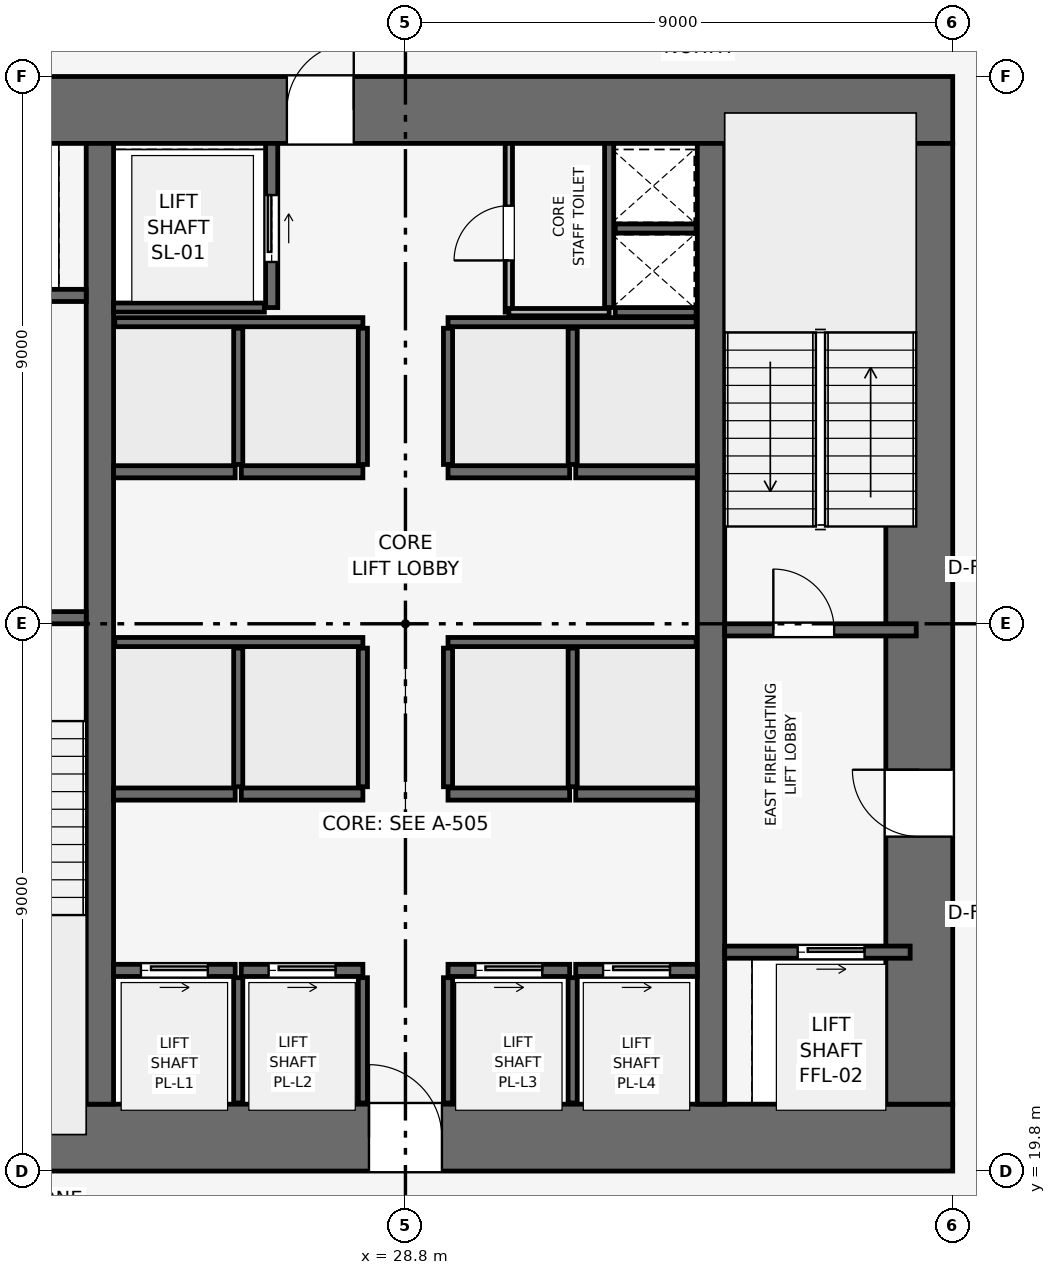
"""IFC4 building model, lengths in metres.
Left out: names, types, materials, properties, quantities, classifications, styles, units other than length and angle.
Written with IfcOpenShell. Run it as: python <this file> out.ifc"""

import sys

from ifc_helpers import new_model, si_unit, direction, frame, frame_2d, origin, place, context, subcontext, project, spatial, rectangle, extrude, element, fill, save


model = new_model("IFC4")
c1 = context("Model", 3, precision=1e-05, world=origin(), true_north=direction((0.0, 1.0)))
c2 = subcontext(c1, "Body", "Model", "MODEL_VIEW")
j1 = project(units=[si_unit("LENGTHUNIT", "METRE"), si_unit("PLANEANGLEUNIT", "RADIAN")], contexts=[c1])
p1 = place(None, origin())
s1 = spatial("IfcSite", under=j1, at=p1, CompositionType="ELEMENT")
p2 = place(p1, origin())
s2 = spatial("IfcBuilding", under=s1, at=p2, CompositionType="ELEMENT")
p3 = place(p2, frame((0.0, 0.0, 100.2)))
s3 = spatial("IfcBuildingStorey", under=s2, at=p3, CompositionType="ELEMENT", Elevation=100.2)
p4 = place(p3, frame((19.8, 20.35, 0.0), z_axis=(0.0, 0.0, 1.0), x_axis=(1.0, 0.0, 0.0)))
e1 = element("IfcWall", 1, at=p4, inside=s3, PredefinedType="SHEAR", context=c2, shape_type="SweptSolid", body=[
    extrude(rectangle(XDim=18.0, YDim=1.1, at=frame_2d((9.0, 0.0))), origin(), (0.0, 0.0, 1.0), 3.9),
])
p5 = place(p4, frame((8.4, 0.0, 0.0)))
e2 = element("IfcOpeningElement", 2, at=p5, cuts=e1, PredefinedType="OPENING", context=c2, shape_type="SweptSolid", body=[
    extrude(rectangle(XDim=1.2, YDim=2.2, at=frame_2d((0.6, 1.1))), frame((0.0, 0.56, 0.0), z_axis=(0.0, -1.0, 0.0), x_axis=(1.0, 0.0, 0.0)), (0.0, 0.0, 1.0), 1.12),
])
p6 = place(p3, frame((19.8, 37.25, 0.0), z_axis=(0.0, 0.0, 1.0), x_axis=(1.0, 0.0, 0.0)))
e3 = element("IfcWall", 3, at=p6, inside=s3, PredefinedType="SHEAR", context=c2, shape_type="SweptSolid", body=[
    extrude(rectangle(XDim=18.0, YDim=1.1, at=frame_2d((9.0, 0.0))), origin(), (0.0, 0.0, 1.0), 3.9),
])
p7 = place(p6, frame((7.05, 0.0, 0.0)))
e4 = element("IfcOpeningElement", 4, at=p7, cuts=e3, PredefinedType="OPENING", context=c2, shape_type="SweptSolid", body=[
    extrude(rectangle(XDim=1.1, YDim=2.15, at=frame_2d((0.55, 1.075))), frame((0.0, 0.56, 0.0), z_axis=(0.0, -1.0, 0.0), x_axis=(1.0, 0.0, 0.0)), (0.0, 0.0, 1.0), 1.12),
])
p8 = place(p3, frame((37.25, 20.9, 0.0), z_axis=(0.0, 0.0, 1.0), x_axis=(0.0, 1.0, 0.0)))
e5 = element("IfcWall", 5, at=p8, inside=s3, PredefinedType="SHEAR", context=c2, shape_type="SweptSolid", body=[
    extrude(rectangle(XDim=15.8, YDim=1.1, at=frame_2d((7.9, 0.0))), origin(), (0.0, 0.0, 1.0), 3.9),
])
p9 = place(p8, frame((4.4, 0.0, 0.0)))
e6 = element("IfcOpeningElement", 6, at=p9, cuts=e5, PredefinedType="OPENING", context=c2, shape_type="SweptSolid", body=[
    extrude(rectangle(XDim=1.1, YDim=2.15, at=frame_2d((0.55, 1.075))), frame((0.0, 0.56, 0.0), z_axis=(0.0, -1.0, 0.0), x_axis=(1.0, 0.0, 0.0)), (0.0, 0.0, 1.0), 1.12),
])
for number, where, z_axis, x_axis in (
    (7, (23.775, 20.9, 0.0), (0.0, 0.0, 1.0), (0.0, 1.0, 0.0)),
    (8, (33.825, 20.9, 0.0), (0.0, 0.0, 1.0), (0.0, 1.0, 0.0)),
):
    element("IfcWall", number, at=place(p3, frame(where, z_axis=z_axis, x_axis=x_axis)), inside=s3, PredefinedType="SHEAR", context=c2, shape_type="SweptSolid", body=[
        extrude(rectangle(XDim=15.8, YDim=0.45, at=frame_2d((7.9, 0.0))), origin(), (0.0, 0.0, 1.0), 3.9),
    ])
p10 = place(p3, frame((20.4, 28.9, 0.0), z_axis=(0.0, 0.0, 1.0), x_axis=(1.0, 0.0, 0.0)))
e9 = element("IfcWall", 9, at=p10, inside=s3, PredefinedType="SHEAR", context=c2, shape_type="SweptSolid", body=[
    extrude(rectangle(XDim=3.15, YDim=0.2, at=frame_2d((1.575, 0.0))), origin(), (0.0, 0.0, 1.0), 3.65),
])
p11 = place(p10, frame((0.8, 0.0, 0.0)))
e10 = element("IfcOpeningElement", 10, at=p11, cuts=e9, PredefinedType="OPENING", context=c2, shape_type="SweptSolid", body=[
    extrude(rectangle(XDim=1.0, YDim=2.1, at=frame_2d((0.5, 1.05))), frame((0.0, 0.11, 0.0), z_axis=(0.0, -1.0, 0.0), x_axis=(1.0, 0.0, 0.0)), (0.0, 0.0, 1.0), 0.22),
])
p12 = place(p3, frame((34.05, 28.7, 0.0), z_axis=(0.0, 0.0, 1.0), x_axis=(1.0, 0.0, 0.0)))
e11 = element("IfcWall", 11, at=p12, inside=s3, PredefinedType="SHEAR", context=c2, shape_type="SweptSolid", body=[
    extrude(rectangle(XDim=3.15, YDim=0.2, at=frame_2d((1.575, 0.0))), origin(), (0.0, 0.0, 1.0), 3.65),
])
p13 = place(p12, frame((0.8, 0.0, 0.0)))
e12 = element("IfcOpeningElement", 12, at=p13, cuts=e11, PredefinedType="OPENING", context=c2, shape_type="SweptSolid", body=[
    extrude(rectangle(XDim=1.0, YDim=2.1, at=frame_2d((0.5, 1.05))), frame((0.0, 0.11, 0.0), z_axis=(0.0, -1.0, 0.0), x_axis=(1.0, 0.0, 0.0)), (0.0, 0.0, 1.0), 0.22),
])
p14 = place(p3, frame((32.15, 34.0, 0.0), z_axis=(0.0, 0.0, 1.0), x_axis=(0.0, 1.0, 0.0)))
e13 = element("IfcWall", 13, at=p14, inside=s3, PredefinedType="SHEAR", context=c2, shape_type="SweptSolid", body=[
    extrude(rectangle(XDim=2.7, YDim=0.15, at=frame_2d((1.35, 0.0))), origin(), (0.0, 0.0, 1.0), 3.65),
])
for number, where, z_axis, x_axis in (
    (14, (32.25, 33.925, 0.0), (0.0, 0.0, 1.0), (1.0, 0.0, 0.0)),
    (15, (32.25, 35.3, 0.0), (0.0, 0.0, 1.0), (1.0, 0.0, 0.0)),
):
    element("IfcWall", number, at=place(p3, frame(where, z_axis=z_axis, x_axis=x_axis)), inside=s3, PredefinedType="SHEAR", context=c2, shape_type="SweptSolid", body=[
        extrude(rectangle(XDim=1.33, YDim=0.15, at=frame_2d((0.665, 0.0))), origin(), (0.0, 0.0, 1.0), 3.65),
    ])
p15 = place(p3, frame((20.5, 34.2, 0.0), z_axis=(0.0, 0.0, 1.0), x_axis=(1.0, 0.0, 0.0)))
e16 = element("IfcWall", 16, at=p15, inside=s3, PredefinedType="SHEAR", context=c2, shape_type="SweptSolid", body=[
    extrude(rectangle(XDim=3.05, YDim=0.2, at=frame_2d((1.525, 0.0))), origin(), (0.0, 0.0, 1.0), 3.65),
])
p16 = place(p15, frame((0.75, 0.0, 0.0)))
e17 = element("IfcOpeningElement", 17, at=p16, cuts=e16, PredefinedType="OPENING", context=c2, shape_type="SweptSolid", body=[
    extrude(rectangle(XDim=1.1, YDim=2.15, at=frame_2d((0.55, 1.075))), frame((0.0, 0.11, 0.0), z_axis=(0.0, -1.0, 0.0), x_axis=(1.0, 0.0, 0.0)), (0.0, 0.0, 1.0), 0.22),
])
p17 = place(p3, frame((34.05, 23.4, 0.0), z_axis=(0.0, 0.0, 1.0), x_axis=(1.0, 0.0, 0.0)))
e18 = element("IfcWall", 18, at=p17, inside=s3, PredefinedType="SHEAR", context=c2, shape_type="SweptSolid", body=[
    extrude(rectangle(XDim=3.05, YDim=0.2, at=frame_2d((1.525, 0.0))), origin(), (0.0, 0.0, 1.0), 3.65),
])
p18 = place(p17, frame((1.2, 0.0, 0.0)))
e19 = element("IfcOpeningElement", 19, at=p18, cuts=e18, PredefinedType="OPENING", context=c2, shape_type="SweptSolid", body=[
    extrude(rectangle(XDim=1.1, YDim=2.15, at=frame_2d((0.55, 1.075))), frame((0.0, 0.11, 0.0), z_axis=(0.0, -1.0, 0.0), x_axis=(1.0, 0.0, 0.0)), (0.0, 0.0, 1.0), 0.22),
])
p19 = place(p3, frame((26.6, 34.0, 0.0), z_axis=(0.0, 0.0, 1.0), x_axis=(0.0, 1.0, 0.0)))
e20 = element("IfcWall", 20, at=p19, inside=s3, PredefinedType="SHEAR", context=c2, shape_type="SweptSolid", body=[
    extrude(rectangle(XDim=2.7, YDim=0.2, at=frame_2d((1.35, 0.0))), origin(), (0.0, 0.0, 1.0), 3.65),
])
p20 = place(p19, frame((0.75, 0.0, 0.0)))
e21 = element("IfcOpeningElement", 21, at=p20, cuts=e20, PredefinedType="OPENING", context=c2, shape_type="SweptSolid", body=[
    extrude(rectangle(XDim=1.1, YDim=2.15, at=frame_2d((0.55, 1.075))), frame((0.0, 0.11, 0.0), z_axis=(0.0, -1.0, 0.0), x_axis=(1.0, 0.0, 0.0)), (0.0, 0.0, 1.0), 0.22),
])
p21 = place(p3, frame((24.0, 34.0, 0.0), z_axis=(0.0, 0.0, 1.0), x_axis=(1.0, 0.0, 0.0)))
e22 = element("IfcWall", 22, at=p21, inside=s3, PredefinedType="SHEAR", context=c2, shape_type="SweptSolid", body=[
    extrude(rectangle(XDim=2.48, YDim=0.15, at=frame_2d((1.24, 0.0))), origin(), (0.0, 0.0, 1.0), 3.65),
])
p22 = place(p3, frame((24.0, 23.1, 0.0), z_axis=(0.0, 0.0, 1.0), x_axis=(1.0, 0.0, 0.0)))
e23 = element("IfcWall", 23, at=p22, inside=s3, PredefinedType="SHEAR", context=c2, shape_type="SweptSolid", body=[
    extrude(rectangle(XDim=2.0, YDim=0.2, at=frame_2d((1.0, 0.0))), origin(), (0.0, 0.0, 1.0), 3.65),
])
p23 = place(p22, frame((0.45, 0.0, 0.0)))
e24 = element("IfcOpeningElement", 24, at=p23, cuts=e23, PredefinedType="OPENING", context=c2, shape_type="SweptSolid", body=[
    extrude(rectangle(XDim=1.1, YDim=2.15, at=frame_2d((0.55, 1.075))), frame((0.0, 0.11, 0.0), z_axis=(0.0, -1.0, 0.0), x_axis=(1.0, 0.0, 0.0)), (0.0, 0.0, 1.0), 0.22),
])
p24 = place(p3, frame((26.1, 23.1, 0.0), z_axis=(0.0, 0.0, 1.0), x_axis=(1.0, 0.0, 0.0)))
e25 = element("IfcWall", 25, at=p24, inside=s3, PredefinedType="SHEAR", context=c2, shape_type="SweptSolid", body=[
    extrude(rectangle(XDim=2.0, YDim=0.2, at=frame_2d((1.0, 0.0))), origin(), (0.0, 0.0, 1.0), 3.65),
])
p25 = place(p24, frame((0.45, 0.0, 0.0)))
e26 = element("IfcOpeningElement", 26, at=p25, cuts=e25, PredefinedType="OPENING", context=c2, shape_type="SweptSolid", body=[
    extrude(rectangle(XDim=1.1, YDim=2.15, at=frame_2d((0.55, 1.075))), frame((0.0, 0.11, 0.0), z_axis=(0.0, -1.0, 0.0), x_axis=(1.0, 0.0, 0.0)), (0.0, 0.0, 1.0), 0.22),
])
p26 = place(p3, frame((29.5, 23.1, 0.0), z_axis=(0.0, 0.0, 1.0), x_axis=(1.0, 0.0, 0.0)))
e27 = element("IfcWall", 27, at=p26, inside=s3, PredefinedType="SHEAR", context=c2, shape_type="SweptSolid", body=[
    extrude(rectangle(XDim=2.0, YDim=0.2, at=frame_2d((1.0, 0.0))), origin(), (0.0, 0.0, 1.0), 3.65),
])
p27 = place(p26, frame((0.45, 0.0, 0.0)))
e28 = element("IfcOpeningElement", 28, at=p27, cuts=e27, PredefinedType="OPENING", context=c2, shape_type="SweptSolid", body=[
    extrude(rectangle(XDim=1.1, YDim=2.15, at=frame_2d((0.55, 1.075))), frame((0.0, 0.11, 0.0), z_axis=(0.0, -1.0, 0.0), x_axis=(1.0, 0.0, 0.0)), (0.0, 0.0, 1.0), 0.22),
])
p28 = place(p3, frame((31.6, 23.1, 0.0), z_axis=(0.0, 0.0, 1.0), x_axis=(1.0, 0.0, 0.0)))
e29 = element("IfcWall", 29, at=p28, inside=s3, PredefinedType="SHEAR", context=c2, shape_type="SweptSolid", body=[
    extrude(rectangle(XDim=2.0, YDim=0.2, at=frame_2d((1.0, 0.0))), origin(), (0.0, 0.0, 1.0), 3.65),
])
p29 = place(p28, frame((0.45, 0.0, 0.0)))
e30 = element("IfcOpeningElement", 30, at=p29, cuts=e29, PredefinedType="OPENING", context=c2, shape_type="SweptSolid", body=[
    extrude(rectangle(XDim=1.1, YDim=2.15, at=frame_2d((0.55, 1.075))), frame((0.0, 0.11, 0.0), z_axis=(0.0, -1.0, 0.0), x_axis=(1.0, 0.0, 0.0)), (0.0, 0.0, 1.0), 0.22),
])
for number, where, z_axis, x_axis in (
    (31, (24.0, 26.0, 0.0), (0.0, 0.0, 1.0), (1.0, 0.0, 0.0)),
    (32, (26.1, 26.0, 0.0), (0.0, 0.0, 1.0), (1.0, 0.0, 0.0)),
    (33, (29.5, 26.0, 0.0), (0.0, 0.0, 1.0), (1.0, 0.0, 0.0)),
    (34, (31.6, 26.0, 0.0), (0.0, 0.0, 1.0), (1.0, 0.0, 0.0)),
    (35, (24.0, 31.3, 0.0), (0.0, 0.0, 1.0), (1.0, 0.0, 0.0)),
    (36, (26.1, 31.3, 0.0), (0.0, 0.0, 1.0), (1.0, 0.0, 0.0)),
    (37, (29.5, 31.3, 0.0), (0.0, 0.0, 1.0), (1.0, 0.0, 0.0)),
    (38, (31.6, 31.3, 0.0), (0.0, 0.0, 1.0), (1.0, 0.0, 0.0)),
):
    element("IfcWall", number, at=place(p3, frame(where, z_axis=z_axis, x_axis=x_axis)), inside=s3, PredefinedType="SHEAR", context=c2, shape_type="SweptSolid", body=[
        extrude(rectangle(XDim=2.0, YDim=0.2, at=frame_2d((1.0, 0.0))), origin(), (0.0, 0.0, 1.0), 3.65),
    ])
for number, where, z_axis, x_axis in (
    (39, (26.05, 20.92, 0.0), (0.0, 0.0, 1.0), (0.0, 1.0, 0.0)),
    (40, (28.1, 20.92, 0.0), (0.0, 0.0, 1.0), (0.0, 1.0, 0.0)),
    (41, (29.5, 20.92, 0.0), (0.0, 0.0, 1.0), (0.0, 1.0, 0.0)),
    (42, (31.55, 20.92, 0.0), (0.0, 0.0, 1.0), (0.0, 1.0, 0.0)),
):
    element("IfcWall", number, at=place(p3, frame(where, z_axis=z_axis, x_axis=x_axis)), inside=s3, PredefinedType="SHEAR", context=c2, shape_type="SweptSolid", body=[
        extrude(rectangle(XDim=2.06, YDim=0.15, at=frame_2d((1.03, 0.0))), origin(), (0.0, 0.0, 1.0), 3.65),
    ])
for number, where, z_axis, x_axis in (
    (43, (24.02, 28.5, 0.0), (0.0, 0.0, 1.0), (1.0, 0.0, 0.0)),
    (44, (29.5, 28.5, 0.0), (0.0, 0.0, 1.0), (1.0, 0.0, 0.0)),
):
    element("IfcWall", number, at=place(p3, frame(where, z_axis=z_axis, x_axis=x_axis)), inside=s3, PredefinedType="SHEAR", context=c2, shape_type="SweptSolid", body=[
        extrude(rectangle(XDim=4.08, YDim=0.15, at=frame_2d((2.04, 0.0))), origin(), (0.0, 0.0, 1.0), 3.65),
    ])
for number, where, z_axis, x_axis in (
    (45, (26.05, 26.12, 0.0), (0.0, 0.0, 1.0), (0.0, 1.0, 0.0)),
    (46, (28.1, 26.12, 0.0), (0.0, 0.0, 1.0), (0.0, 1.0, 0.0)),
    (47, (29.5, 26.12, 0.0), (0.0, 0.0, 1.0), (0.0, 1.0, 0.0)),
    (48, (31.55, 26.12, 0.0), (0.0, 0.0, 1.0), (0.0, 1.0, 0.0)),
):
    element("IfcWall", number, at=place(p3, frame(where, z_axis=z_axis, x_axis=x_axis)), inside=s3, PredefinedType="SHEAR", context=c2, shape_type="SweptSolid", body=[
        extrude(rectangle(XDim=2.28, YDim=0.15, at=frame_2d((1.14, 0.0))), origin(), (0.0, 0.0, 1.0), 3.65),
    ])
for number, where, z_axis, x_axis in (
    (49, (24.02, 33.76, 0.0), (0.0, 0.0, 1.0), (1.0, 0.0, 0.0)),
    (50, (29.5, 33.76, 0.0), (0.0, 0.0, 1.0), (1.0, 0.0, 0.0)),
):
    element("IfcWall", number, at=place(p3, frame(where, z_axis=z_axis, x_axis=x_axis)), inside=s3, PredefinedType="SHEAR", context=c2, shape_type="SweptSolid", body=[
        extrude(rectangle(XDim=4.08, YDim=0.15, at=frame_2d((2.04, 0.0))), origin(), (0.0, 0.0, 1.0), 3.65),
    ])
for number, where, z_axis, x_axis in (
    (51, (26.05, 31.42, 0.0), (0.0, 0.0, 1.0), (0.0, 1.0, 0.0)),
    (52, (28.1, 31.42, 0.0), (0.0, 0.0, 1.0), (0.0, 1.0, 0.0)),
    (53, (29.5, 31.42, 0.0), (0.0, 0.0, 1.0), (0.0, 1.0, 0.0)),
    (54, (31.55, 31.42, 0.0), (0.0, 0.0, 1.0), (0.0, 1.0, 0.0)),
):
    element("IfcWall", number, at=place(p3, frame(where, z_axis=z_axis, x_axis=x_axis)), inside=s3, PredefinedType="SHEAR", context=c2, shape_type="SweptSolid", body=[
        extrude(rectangle(XDim=2.24, YDim=0.15, at=frame_2d((1.12, 0.0))), origin(), (0.0, 0.0, 1.0), 3.65),
    ])
p30 = place(p3, frame((30.5, 33.925, 0.0), z_axis=(0.0, 0.0, 1.0), x_axis=(0.0, 1.0, 0.0)))
e55 = element("IfcWall", 55, at=p30, inside=s3, PredefinedType="PARTITIONING", context=c2, shape_type="SweptSolid", body=[
    extrude(rectangle(XDim=2.775, YDim=0.12, at=frame_2d((1.387, 0.0))), origin(), (0.0, 0.0, 1.0), 3.65),
])
p31 = place(p30, frame((0.85, 0.0, 0.0)))
e56 = element("IfcOpeningElement", 56, at=p31, cuts=e55, PredefinedType="OPENING", context=c2, shape_type="SweptSolid", body=[
    extrude(rectangle(XDim=0.9, YDim=2.1, at=frame_2d((0.45, 1.05))), frame((0.0, 0.07, 0.0), z_axis=(0.0, -1.0, 0.0), x_axis=(1.0, 0.0, 0.0)), (0.0, 0.0, 1.0), 0.14),
])
p32 = place(p3, frame((30.5, 33.925, 0.0), z_axis=(0.0, 0.0, 1.0), x_axis=(1.0, 0.0, 0.0)))
e57 = element("IfcWall", 57, at=p32, inside=s3, PredefinedType="PARTITIONING", context=c2, shape_type="SweptSolid", body=[
    extrude(rectangle(XDim=1.65, YDim=0.12, at=frame_2d((0.825, 0.0))), origin(), (0.0, 0.0, 1.0), 3.65),
])
p33 = place(p13, origin())
e58 = element("IfcDoor", 58, at=p33, inside=s3, OperationType="SINGLE_SWING_LEFT", PredefinedType="DOOR", context=c2, shape_type="SweptSolid", body=[
    extrude(rectangle(XDim=1.0, YDim=2.1, at=frame_2d((0.5, 1.05))), frame((0.0, 0.025, 0.0), z_axis=(0.0, -1.0, 0.0), x_axis=(1.0, 0.0, 0.0)), (0.0, 0.0, 1.0), 0.05),
])
fill(e12, e58)
p34 = place(p18, origin())
e59 = element("IfcDoor", 59, at=p34, inside=s3, OperationType="SLIDING_TO_RIGHT", PredefinedType="DOOR", context=c2, shape_type="SweptSolid", body=[
    extrude(rectangle(XDim=1.1, YDim=2.15, at=frame_2d((0.55, 1.075))), frame((0.0, 0.025, 0.0), z_axis=(0.0, -1.0, 0.0), x_axis=(1.0, 0.0, 0.0)), (0.0, 0.0, 1.0), 0.05),
])
fill(e19, e59)
p35 = place(p20, origin())
e60 = element("IfcDoor", 60, at=p35, inside=s3, OperationType="SLIDING_TO_RIGHT", PredefinedType="DOOR", context=c2, shape_type="SweptSolid", body=[
    extrude(rectangle(XDim=1.1, YDim=2.15, at=frame_2d((0.55, 1.075))), frame((0.0, 0.025, 0.0), z_axis=(0.0, -1.0, 0.0), x_axis=(1.0, 0.0, 0.0)), (0.0, 0.0, 1.0), 0.05),
])
fill(e21, e60)
p36 = place(p23, origin())
e61 = element("IfcDoor", 61, at=p36, inside=s3, OperationType="SLIDING_TO_RIGHT", PredefinedType="DOOR", context=c2, shape_type="SweptSolid", body=[
    extrude(rectangle(XDim=1.1, YDim=2.15, at=frame_2d((0.55, 1.075))), frame((0.0, 0.025, 0.0), z_axis=(0.0, -1.0, 0.0), x_axis=(1.0, 0.0, 0.0)), (0.0, 0.0, 1.0), 0.05),
])
fill(e24, e61)
p37 = place(p25, origin())
e62 = element("IfcDoor", 62, at=p37, inside=s3, OperationType="SLIDING_TO_RIGHT", PredefinedType="DOOR", context=c2, shape_type="SweptSolid", body=[
    extrude(rectangle(XDim=1.1, YDim=2.15, at=frame_2d((0.55, 1.075))), frame((0.0, 0.025, 0.0), z_axis=(0.0, -1.0, 0.0), x_axis=(1.0, 0.0, 0.0)), (0.0, 0.0, 1.0), 0.05),
])
fill(e26, e62)
p38 = place(p27, origin())
e63 = element("IfcDoor", 63, at=p38, inside=s3, OperationType="SLIDING_TO_RIGHT", PredefinedType="DOOR", context=c2, shape_type="SweptSolid", body=[
    extrude(rectangle(XDim=1.1, YDim=2.15, at=frame_2d((0.55, 1.075))), frame((0.0, 0.025, 0.0), z_axis=(0.0, -1.0, 0.0), x_axis=(1.0, 0.0, 0.0)), (0.0, 0.0, 1.0), 0.05),
])
fill(e28, e63)
p39 = place(p29, origin())
e64 = element("IfcDoor", 64, at=p39, inside=s3, OperationType="SLIDING_TO_RIGHT", PredefinedType="DOOR", context=c2, shape_type="SweptSolid", body=[
    extrude(rectangle(XDim=1.1, YDim=2.15, at=frame_2d((0.55, 1.075))), frame((0.0, 0.025, 0.0), z_axis=(0.0, -1.0, 0.0), x_axis=(1.0, 0.0, 0.0)), (0.0, 0.0, 1.0), 0.05),
])
fill(e30, e64)
p40 = place(p31, origin())
e65 = element("IfcDoor", 65, at=p40, inside=s3, OperationType="SINGLE_SWING_LEFT", PredefinedType="DOOR", context=c2, shape_type="SweptSolid", body=[
    extrude(rectangle(XDim=0.9, YDim=2.1, at=frame_2d((0.45, 1.05))), frame((0.0, 0.025, 0.0), z_axis=(0.0, -1.0, 0.0), x_axis=(1.0, 0.0, 0.0)), (0.0, 0.0, 1.0), 0.05),
])
fill(e56, e65)
p41 = place(p9, origin())
e66 = element("IfcDoor", 66, at=p41, inside=s3, OperationType="SINGLE_SWING_RIGHT", PredefinedType="DOOR", context=c2, shape_type="SweptSolid", body=[
    extrude(rectangle(XDim=1.1, YDim=2.15, at=frame_2d((0.55, 1.075))), frame((0.0, 0.025, 0.0), z_axis=(0.0, -1.0, 0.0), x_axis=(1.0, 0.0, 0.0)), (0.0, 0.0, 1.0), 0.05),
])
fill(e6, e66)
p42 = place(p5, origin())
e67 = element("IfcDoor", 67, at=p42, inside=s3, OperationType="SINGLE_SWING_LEFT", PredefinedType="DOOR", context=c2, shape_type="SweptSolid", body=[
    extrude(rectangle(XDim=1.2, YDim=2.2, at=frame_2d((0.6, 1.1))), frame((0.0, 0.025, 0.0), z_axis=(0.0, -1.0, 0.0), x_axis=(1.0, 0.0, 0.0)), (0.0, 0.0, 1.0), 0.05),
])
fill(e2, e67)
p43 = place(p7, origin())
e68 = element("IfcDoor", 68, at=p43, inside=s3, OperationType="SINGLE_SWING_RIGHT", PredefinedType="DOOR", context=c2, shape_type="SweptSolid", body=[
    extrude(rectangle(XDim=1.1, YDim=2.15, at=frame_2d((0.55, 1.075))), frame((0.0, 0.025, 0.0), z_axis=(0.0, -1.0, 0.0), x_axis=(1.0, 0.0, 0.0)), (0.0, 0.0, 1.0), 0.05),
])
fill(e4, e68)
save(model, sys.argv[1])
